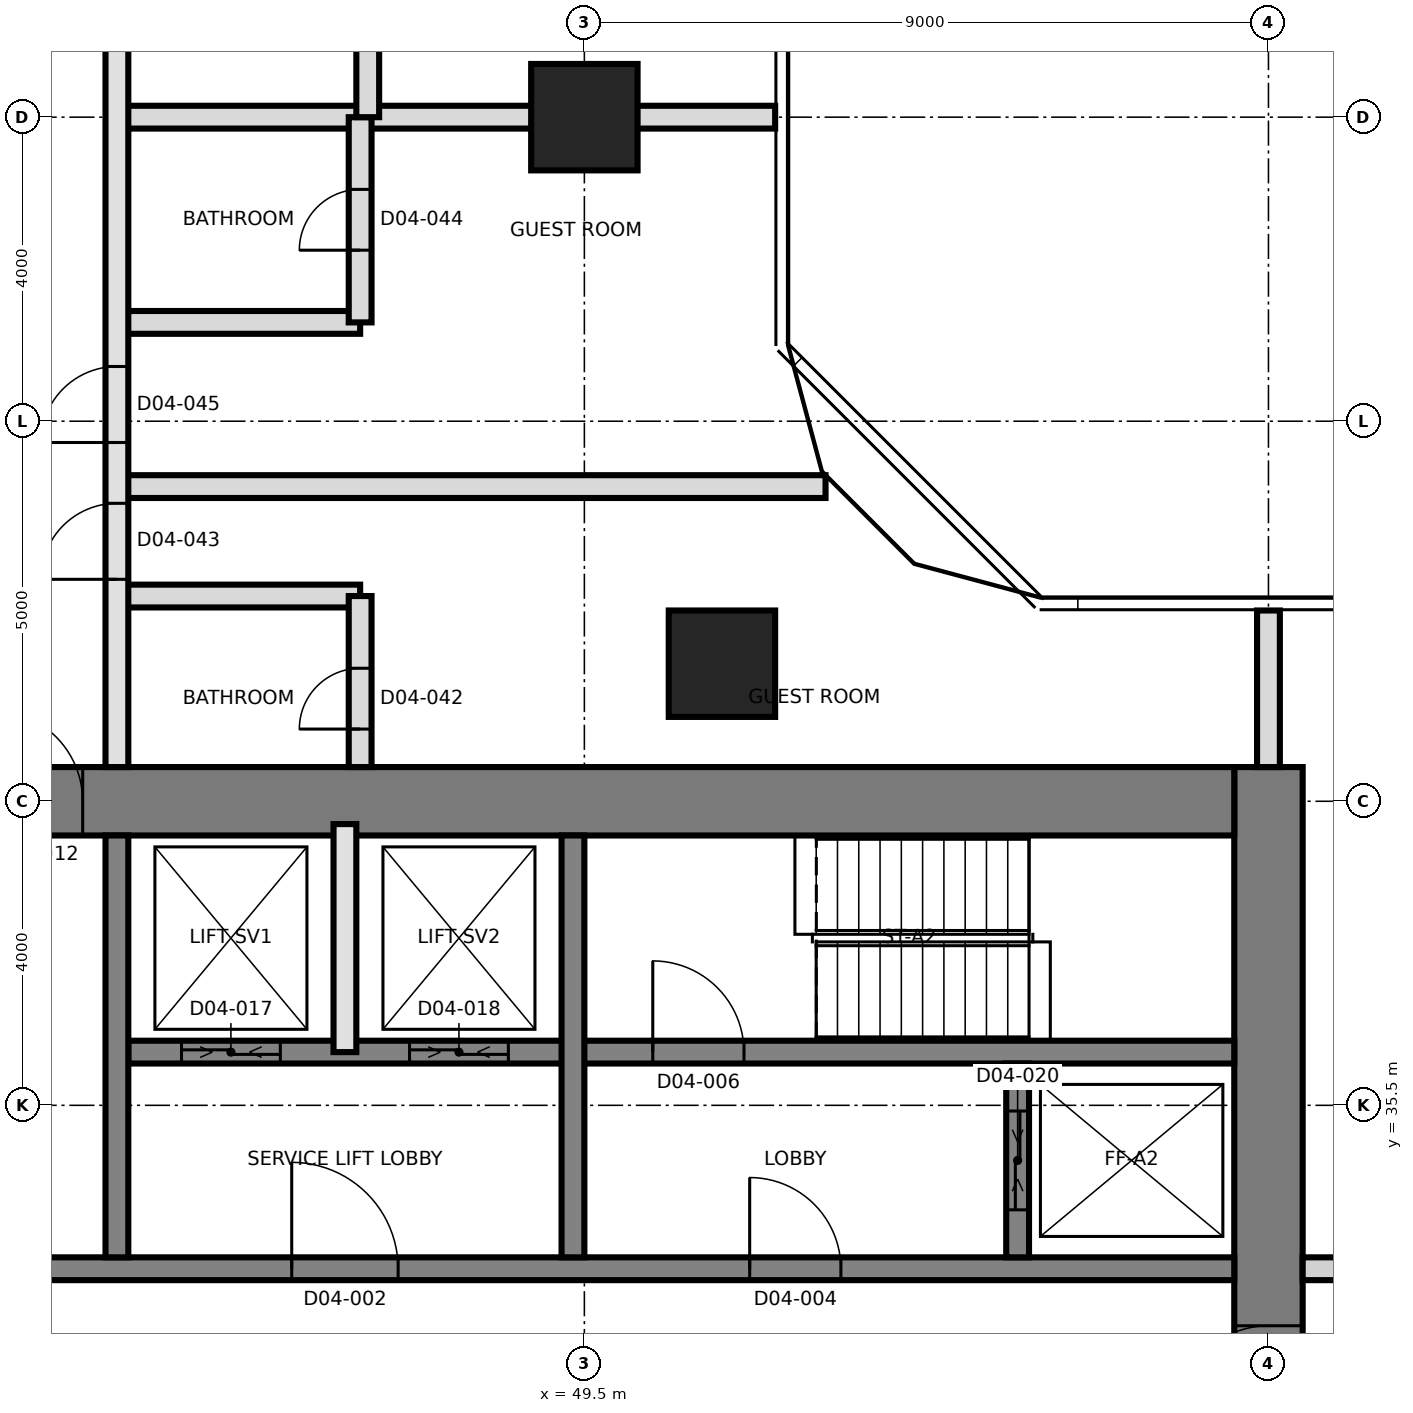
"""IFC4 building model, lengths in metres.
Left out: names, types, materials, properties, quantities, classifications, styles, units other than length and angle.
Written with IfcOpenShell. Run it as: python <this file> out.ifc"""

import sys

from ifc_helpers import new_model, si_unit, direction, frame, frame_2d, origin, origin_2d, place, context, subcontext, project, spatial, rectangle, extrude, element, fill, save


model = new_model("IFC4")
c1 = context("Model", 3, precision=1e-05, world=origin(), true_north=direction((0.0, 1.0)))
c2 = subcontext(c1, "Body", "Model", "MODEL_VIEW")
j1 = project(units=[si_unit("LENGTHUNIT", "METRE"), si_unit("PLANEANGLEUNIT", "RADIAN")], contexts=[c1])
p1 = place(None, origin())
s1 = spatial("IfcSite", under=j1, at=p1, CompositionType="ELEMENT")
p2 = place(p1, origin())
s2 = spatial("IfcBuilding", under=s1, at=p2, CompositionType="ELEMENT")
p3 = place(p2, frame((0.0, 0.0, 63.1)))
s3 = spatial("IfcBuildingStorey", under=s2, at=p3, CompositionType="ELEMENT", Elevation=63.1)
p4 = place(p3, frame((58.5, 21.05, 0.0), z_axis=(0.0, 0.0, 1.0), x_axis=(0.0, 1.0, 0.0)))
e1 = element("IfcWall", 1, at=p4, inside=s3, PredefinedType="SHEAR", context=c2, shape_type="SweptSolid", body=[
    extrude(rectangle(XDim=18.9, YDim=0.9, at=frame_2d((9.45, 0.0))), origin(), (0.0, 0.0, 1.0), 3.7),
])
p5 = place(p4, frame((10.35, 0.0, 0.0)))
e2 = element("IfcOpeningElement", 2, at=p5, cuts=e1, PredefinedType="OPENING", context=c2, shape_type="SweptSolid", body=[
    extrude(rectangle(XDim=1.2, YDim=2.1, at=frame_2d((0.6, 1.05))), frame((0.0, 0.46, 0.0), z_axis=(0.0, -1.0, 0.0), x_axis=(1.0, 0.0, 0.0)), (0.0, 0.0, 1.0), 0.92),
])
p6 = place(p3, frame((31.05, 39.5, 0.0), z_axis=(0.0, 0.0, 1.0), x_axis=(1.0, 0.0, 0.0)))
e3 = element("IfcWall", 3, at=p6, inside=s3, PredefinedType="SHEAR", context=c2, shape_type="SweptSolid", body=[
    extrude(rectangle(XDim=27.0, YDim=0.9, at=frame_2d((13.5, 0.0))), origin(), (0.0, 0.0, 1.0), 3.7),
])
p7 = place(p6, frame((10.65, 0.0, 0.0)))
e4 = element("IfcOpeningElement", 4, at=p7, cuts=e3, PredefinedType="OPENING", context=c2, shape_type="SweptSolid", body=[
    extrude(rectangle(XDim=1.2, YDim=2.1, at=frame_2d((0.6, 1.05))), frame((0.0, 0.46, 0.0), z_axis=(0.0, -1.0, 0.0), x_axis=(1.0, 0.0, 0.0)), (0.0, 0.0, 1.0), 0.92),
])
p8 = place(p3, frame((31.95, 33.35, 0.0), z_axis=(0.0, 0.0, 1.0), x_axis=(1.0, 0.0, 0.0)))
e5 = element("IfcWall", 5, at=p8, inside=s3, PredefinedType="SHEAR", context=c2, shape_type="SweptSolid", body=[
    extrude(rectangle(XDim=26.1, YDim=0.3, at=frame_2d((13.05, 0.0))), origin(), (0.0, 0.0, 1.0), 3.7),
])
p9 = place(p8, frame((13.7, 0.0, 0.0)))
e6 = element("IfcOpeningElement", 6, at=p9, cuts=e5, PredefinedType="OPENING", context=c2, shape_type="SweptSolid", body=[
    extrude(rectangle(XDim=1.4, YDim=2.1, at=frame_2d((0.7, 1.05))), frame((0.0, 0.16, 0.0), z_axis=(0.0, -1.0, 0.0), x_axis=(1.0, 0.0, 0.0)), (0.0, 0.0, 1.0), 0.32),
])
p10 = place(p8, frame((5.175, 0.0, 0.0)))
e7 = element("IfcOpeningElement", 7, at=p10, cuts=e5, PredefinedType="OPENING", context=c2, shape_type="SweptSolid", body=[
    extrude(rectangle(XDim=1.2, YDim=2.1, at=frame_2d((0.6, 1.05))), frame((0.0, 0.16, 0.0), z_axis=(0.0, -1.0, 0.0), x_axis=(1.0, 0.0, 0.0)), (0.0, 0.0, 1.0), 0.32),
])
p11 = place(p8, frame((19.725, 0.0, 0.0)))
e8 = element("IfcOpeningElement", 8, at=p11, cuts=e5, PredefinedType="OPENING", context=c2, shape_type="SweptSolid", body=[
    extrude(rectangle(XDim=1.2, YDim=2.1, at=frame_2d((0.6, 1.05))), frame((0.0, 0.16, 0.0), z_axis=(0.0, -1.0, 0.0), x_axis=(1.0, 0.0, 0.0)), (0.0, 0.0, 1.0), 0.32),
])
p12 = place(p3, frame((43.5, 36.2, 0.0), z_axis=(0.0, 0.0, 1.0), x_axis=(1.0, 0.0, 0.0)))
e9 = element("IfcWall", 9, at=p12, inside=s3, PredefinedType="SHEAR", context=c2, shape_type="SweptSolid", body=[
    extrude(rectangle(XDim=14.55, YDim=0.3, at=frame_2d((7.275, 0.0))), origin(), (0.0, 0.0, 1.0), 3.7),
])
p13 = place(p12, frame((6.9, 0.0, 0.0)))
e10 = element("IfcOpeningElement", 10, at=p13, cuts=e9, PredefinedType="OPENING", context=c2, shape_type="SweptSolid", body=[
    extrude(rectangle(XDim=1.2, YDim=2.1, at=frame_2d((0.6, 1.05))), frame((0.0, 0.16, 0.0), z_axis=(0.0, -1.0, 0.0), x_axis=(1.0, 0.0, 0.0)), (0.0, 0.0, 1.0), 0.32),
])
p14 = place(p12, frame((0.7, 0.0, 0.0)))
e11 = element("IfcOpeningElement", 11, at=p14, cuts=e9, PredefinedType="OPENING", context=c2, shape_type="SweptSolid", body=[
    extrude(rectangle(XDim=1.3, YDim=2.4, at=frame_2d((0.65, 1.2))), frame((0.0, 0.16, 0.0), z_axis=(0.0, -1.0, 0.0), x_axis=(1.0, 0.0, 0.0)), (0.0, 0.0, 1.0), 0.32),
])
p15 = place(p12, frame((3.7, 0.0, 0.0)))
e12 = element("IfcOpeningElement", 12, at=p15, cuts=e9, PredefinedType="OPENING", context=c2, shape_type="SweptSolid", body=[
    extrude(rectangle(XDim=1.3, YDim=2.4, at=frame_2d((0.65, 1.2))), frame((0.0, 0.16, 0.0), z_axis=(0.0, -1.0, 0.0), x_axis=(1.0, 0.0, 0.0)), (0.0, 0.0, 1.0), 0.32),
])
for number, where, z_axis, x_axis in (
    (13, (43.35, 33.5, 0.0), (0.0, 0.0, 1.0), (0.0, 1.0, 0.0)),
    (14, (49.35, 33.5, 0.0), (0.0, 0.0, 1.0), (0.0, 1.0, 0.0)),
):
    element("IfcWall", number, at=place(p3, frame(where, z_axis=z_axis, x_axis=x_axis)), inside=s3, PredefinedType="SHEAR", context=c2, shape_type="SweptSolid", body=[
        extrude(rectangle(XDim=5.55, YDim=0.3, at=frame_2d((2.775, 0.0))), origin(), (0.0, 0.0, 1.0), 3.7),
    ])
p16 = place(p3, frame((55.2, 33.5, 0.0), z_axis=(0.0, 0.0, 1.0), x_axis=(0.0, 1.0, 0.0)))
e15 = element("IfcWall", 15, at=p16, inside=s3, PredefinedType="SHEAR", context=c2, shape_type="SweptSolid", body=[
    extrude(rectangle(XDim=2.55, YDim=0.3, at=frame_2d((1.275, 0.0))), origin(), (0.0, 0.0, 1.0), 3.7),
])
p17 = place(p16, frame((0.625, 0.0, 0.0)))
e16 = element("IfcOpeningElement", 16, at=p17, cuts=e15, PredefinedType="OPENING", context=c2, shape_type="SweptSolid", body=[
    extrude(rectangle(XDim=1.3, YDim=2.4, at=frame_2d((0.65, 1.2))), frame((0.0, 0.16, 0.0), z_axis=(0.0, -1.0, 0.0), x_axis=(1.0, 0.0, 0.0)), (0.0, 0.0, 1.0), 0.32),
])
for number, where, z_axis, x_axis in (
    (17, (51.31, 41.31, 0.0), (0.0, 0.0, 1.0), (1.0, 0.0, 0.0)),
    (18, (49.5, 48.5, 0.0), (0.0, 0.0, 1.0), (1.0, 0.0, 0.0)),
):
    element("IfcColumn", number, at=place(p3, frame(where, z_axis=z_axis, x_axis=x_axis)), inside=s3, PredefinedType="COLUMN", context=c2, shape_type="SweptSolid", body=[
        extrude(rectangle(XDim=1.4, YDim=1.4, at=origin_2d()), origin(), (0.0, 0.0, 1.0), 3.7),
    ])
p18 = place(p3, frame((46.35, 36.2, 0.0), z_axis=(0.0, 0.0, 1.0), x_axis=(0.0, 1.0, 0.0)))
e19 = element("IfcWall", 19, at=p18, inside=s3, PredefinedType="SOLIDWALL", context=c2, shape_type="SweptSolid", body=[
    extrude(rectangle(XDim=3.0, YDim=0.3, at=frame_2d((1.5, 0.0))), origin(), (0.0, 0.0, 1.0), 3.4),
])
p19 = place(p3, frame((58.95, 33.35, 0.0), z_axis=(0.0, 0.0, 1.0), x_axis=(1.0, 0.0, 0.0)))
e20 = element("IfcWall", 20, at=p19, inside=s3, PredefinedType="PARTITIONING", context=c2, shape_type="SweptSolid", body=[
    extrude(rectangle(XDim=26.38, YDim=0.3, at=frame_2d((13.19, 0.0))), origin(), (0.0, 0.0, 1.0), 3.4),
])
p20 = place(p19, frame((1.9, 0.0, 0.0)))
e21 = element("IfcOpeningElement", 21, at=p20, cuts=e20, PredefinedType="OPENING", context=c2, shape_type="SweptSolid", body=[
    extrude(rectangle(XDim=1.0, YDim=2.4, at=frame_2d((0.5, 1.2))), frame((0.0, 0.16, 0.0), z_axis=(0.0, -1.0, 0.0), x_axis=(1.0, 0.0, 0.0)), (0.0, 0.0, 1.0), 0.32),
])
p21 = place(p19, frame((9.685, 0.0, 0.0)))
e22 = element("IfcOpeningElement", 22, at=p21, cuts=e20, PredefinedType="OPENING", context=c2, shape_type="SweptSolid", body=[
    extrude(rectangle(XDim=1.2, YDim=2.1, at=frame_2d((0.6, 1.05))), frame((0.0, 0.16, 0.0), z_axis=(0.0, -1.0, 0.0), x_axis=(1.0, 0.0, 0.0)), (0.0, 0.0, 1.0), 0.32),
])
p22 = place(p19, frame((12.935, 0.0, 0.0)))
e23 = element("IfcOpeningElement", 23, at=p22, cuts=e20, PredefinedType="OPENING", context=c2, shape_type="SweptSolid", body=[
    extrude(rectangle(XDim=1.0, YDim=2.1, at=frame_2d((0.5, 1.05))), frame((0.0, 0.16, 0.0), z_axis=(0.0, -1.0, 0.0), x_axis=(1.0, 0.0, 0.0)), (0.0, 0.0, 1.0), 0.32),
])
p23 = place(p19, frame((18.7, 0.0, 0.0)))
e24 = element("IfcOpeningElement", 24, at=p23, cuts=e20, PredefinedType="OPENING", context=c2, shape_type="SweptSolid", body=[
    extrude(rectangle(XDim=1.0, YDim=2.1, at=frame_2d((0.5, 1.05))), frame((0.0, 0.16, 0.0), z_axis=(0.0, -1.0, 0.0), x_axis=(1.0, 0.0, 0.0)), (0.0, 0.0, 1.0), 0.32),
])
p24 = place(p19, frame((24.55, 0.0, 0.0)))
e25 = element("IfcOpeningElement", 25, at=p24, cuts=e20, PredefinedType="OPENING", context=c2, shape_type="SweptSolid", body=[
    extrude(rectangle(XDim=1.0, YDim=2.1, at=frame_2d((0.5, 1.05))), frame((0.0, 0.16, 0.0), z_axis=(0.0, -1.0, 0.0), x_axis=(1.0, 0.0, 0.0)), (0.0, 0.0, 1.0), 0.32),
])
p25 = place(p3, frame((43.35, 42.2, 0.0), z_axis=(0.0, 0.0, 1.0), x_axis=(1.0, 0.0, 0.0)))
e26 = element("IfcWall", 26, at=p25, inside=s3, PredefinedType="PARTITIONING", context=c2, shape_type="SweptSolid", body=[
    extrude(rectangle(XDim=3.2, YDim=0.3, at=frame_2d((1.6, 0.0))), origin(), (0.0, 0.0, 1.0), 3.4),
])
p26 = place(p3, frame((43.35, 43.64, 0.0), z_axis=(0.0, 0.0, 1.0), x_axis=(1.0, 0.0, 0.0)))
e27 = element("IfcWall", 27, at=p26, inside=s3, PredefinedType="PARTITIONING", context=c2, shape_type="SweptSolid", body=[
    extrude(rectangle(XDim=9.323, YDim=0.3, at=frame_2d((4.662, 0.0))), origin(), (0.0, 0.0, 1.0), 3.4),
])
p27 = place(p3, frame((43.35, 45.8, 0.0), z_axis=(0.0, 0.0, 1.0), x_axis=(1.0, 0.0, 0.0)))
e28 = element("IfcWall", 28, at=p27, inside=s3, PredefinedType="PARTITIONING", context=c2, shape_type="SweptSolid", body=[
    extrude(rectangle(XDim=3.2, YDim=0.3, at=frame_2d((1.6, 0.0))), origin(), (0.0, 0.0, 1.0), 3.4),
])
p28 = place(p3, frame((43.35, 48.5, 0.0), z_axis=(0.0, 0.0, 1.0), x_axis=(1.0, 0.0, 0.0)))
e29 = element("IfcWall", 29, at=p28, inside=s3, PredefinedType="PARTITIONING", context=c2, shape_type="SweptSolid", body=[
    extrude(rectangle(XDim=8.66, YDim=0.3, at=frame_2d((4.33, 0.0))), origin(), (0.0, 0.0, 1.0), 3.4),
])
p29 = place(p3, frame((43.35, 39.95, 0.0), z_axis=(0.0, 0.0, 1.0), x_axis=(0.0, 1.0, 0.0)))
e30 = element("IfcWall", 30, at=p29, inside=s3, PredefinedType="SOLIDWALL", context=c2, shape_type="SweptSolid", body=[
    extrude(rectangle(XDim=25.8, YDim=0.3, at=frame_2d((12.9, 0.0))), origin(), (0.0, 0.0, 1.0), 3.4),
])
p30 = place(p29, frame((2.47, 0.0, 0.0)))
e31 = element("IfcOpeningElement", 31, at=p30, cuts=e30, PredefinedType="OPENING", context=c2, shape_type="SweptSolid", body=[
    extrude(rectangle(XDim=1.0, YDim=2.1, at=frame_2d((0.5, 1.05))), frame((0.0, 0.16, 0.0), z_axis=(0.0, -1.0, 0.0), x_axis=(1.0, 0.0, 0.0)), (0.0, 0.0, 1.0), 0.32),
])
p31 = place(p29, frame((4.27, 0.0, 0.0)))
e32 = element("IfcOpeningElement", 32, at=p31, cuts=e30, PredefinedType="OPENING", context=c2, shape_type="SweptSolid", body=[
    extrude(rectangle(XDim=1.0, YDim=2.1, at=frame_2d((0.5, 1.05))), frame((0.0, 0.16, 0.0), z_axis=(0.0, -1.0, 0.0), x_axis=(1.0, 0.0, 0.0)), (0.0, 0.0, 1.0), 0.32),
])
p32 = place(p29, frame((12.55, 0.0, 0.0)))
e33 = element("IfcOpeningElement", 33, at=p32, cuts=e30, PredefinedType="OPENING", context=c2, shape_type="SweptSolid", body=[
    extrude(rectangle(XDim=1.0, YDim=2.4, at=frame_2d((0.5, 1.2))), frame((0.0, 0.16, 0.0), z_axis=(0.0, -1.0, 0.0), x_axis=(1.0, 0.0, 0.0)), (0.0, 0.0, 1.0), 0.32),
])
p33 = place(p29, frame((19.55, 0.0, 0.0)))
e34 = element("IfcOpeningElement", 34, at=p33, cuts=e30, PredefinedType="OPENING", context=c2, shape_type="SweptSolid", body=[
    extrude(rectangle(XDim=1.0, YDim=2.4, at=frame_2d((0.5, 1.2))), frame((0.0, 0.16, 0.0), z_axis=(0.0, -1.0, 0.0), x_axis=(1.0, 0.0, 0.0)), (0.0, 0.0, 1.0), 0.32),
])
p34 = place(p3, frame((46.55, 39.95, 0.0), z_axis=(0.0, 0.0, 1.0), x_axis=(0.0, 1.0, 0.0)))
e35 = element("IfcWall", 35, at=p34, inside=s3, PredefinedType="PARTITIONING", context=c2, shape_type="SweptSolid", body=[
    extrude(rectangle(XDim=2.25, YDim=0.3, at=frame_2d((1.125, 0.0))), origin(), (0.0, 0.0, 1.0), 3.4),
])
p35 = place(p34, frame((0.5, 0.0, 0.0)))
e36 = element("IfcOpeningElement", 36, at=p35, cuts=e35, PredefinedType="OPENING", context=c2, shape_type="SweptSolid", body=[
    extrude(rectangle(XDim=0.8, YDim=2.1, at=frame_2d((0.4, 1.05))), frame((0.0, 0.16, 0.0), z_axis=(0.0, -1.0, 0.0), x_axis=(1.0, 0.0, 0.0)), (0.0, 0.0, 1.0), 0.32),
])
p36 = place(p3, frame((46.55, 45.8, 0.0), z_axis=(0.0, 0.0, 1.0), x_axis=(0.0, 1.0, 0.0)))
e37 = element("IfcWall", 37, at=p36, inside=s3, PredefinedType="PARTITIONING", context=c2, shape_type="SweptSolid", body=[
    extrude(rectangle(XDim=2.7, YDim=0.3, at=frame_2d((1.35, 0.0))), origin(), (0.0, 0.0, 1.0), 3.4),
])
p37 = place(p36, frame((0.95, 0.0, 0.0)))
e38 = element("IfcOpeningElement", 38, at=p37, cuts=e37, PredefinedType="OPENING", context=c2, shape_type="SweptSolid", body=[
    extrude(rectangle(XDim=0.8, YDim=2.1, at=frame_2d((0.4, 1.05))), frame((0.0, 0.16, 0.0), z_axis=(0.0, -1.0, 0.0), x_axis=(1.0, 0.0, 0.0)), (0.0, 0.0, 1.0), 0.32),
])
p38 = place(p3, frame((46.65, 48.5, 0.0), z_axis=(0.0, 0.0, 1.0), x_axis=(0.0, 1.0, 0.0)))
e39 = element("IfcWall", 39, at=p38, inside=s3, PredefinedType="PARTITIONING", context=c2, shape_type="SweptSolid", body=[
    extrude(rectangle(XDim=3.0, YDim=0.3, at=frame_2d((1.5, 0.0))), origin(), (0.0, 0.0, 1.0), 3.4),
])
p39 = place(p38, frame((1.1, 0.0, 0.0)))
e40 = element("IfcOpeningElement", 40, at=p39, cuts=e39, PredefinedType="OPENING", context=c2, shape_type="SweptSolid", body=[
    extrude(rectangle(XDim=0.8, YDim=2.1, at=frame_2d((0.4, 1.05))), frame((0.0, 0.16, 0.0), z_axis=(0.0, -1.0, 0.0), x_axis=(1.0, 0.0, 0.0)), (0.0, 0.0, 1.0), 0.32),
])
p40 = place(p3, frame((58.5, 39.95, 0.0), z_axis=(0.0, 0.0, 1.0), x_axis=(0.0, 1.0, 0.0)))
e41 = element("IfcWall", 41, at=p40, inside=s3, PredefinedType="PARTITIONING", context=c2, shape_type="SweptSolid", body=[
    extrude(rectangle(XDim=2.06, YDim=0.3, at=frame_2d((1.03, 0.0))), origin(), (0.0, 0.0, 1.0), 3.4),
])
p41 = place(p9, origin())
e42 = element("IfcDoor", 42, at=p41, inside=s3, OperationType="SINGLE_SWING_RIGHT", PredefinedType="DOOR", context=c2, shape_type="SweptSolid", body=[
    extrude(rectangle(XDim=1.4, YDim=2.1, at=frame_2d((0.7, 1.05))), frame((0.0, 0.025, 0.0), z_axis=(0.0, -1.0, 0.0), x_axis=(1.0, 0.0, 0.0)), (0.0, 0.0, 1.0), 0.05),
])
fill(e6, e42)
p42 = place(p11, origin())
e43 = element("IfcDoor", 43, at=p42, inside=s3, OperationType="SINGLE_SWING_RIGHT", PredefinedType="DOOR", context=c2, shape_type="SweptSolid", body=[
    extrude(rectangle(XDim=1.2, YDim=2.1, at=frame_2d((0.6, 1.05))), frame((0.0, 0.025, 0.0), z_axis=(0.0, -1.0, 0.0), x_axis=(1.0, 0.0, 0.0)), (0.0, 0.0, 1.0), 0.05),
])
fill(e8, e43)
p43 = place(p13, origin())
e44 = element("IfcDoor", 44, at=p43, inside=s3, OperationType="SINGLE_SWING_LEFT", PredefinedType="DOOR", context=c2, shape_type="SweptSolid", body=[
    extrude(rectangle(XDim=1.2, YDim=2.1, at=frame_2d((0.6, 1.05))), frame((0.0, 0.025, 0.0), z_axis=(0.0, -1.0, 0.0), x_axis=(1.0, 0.0, 0.0)), (0.0, 0.0, 1.0), 0.05),
])
fill(e10, e44)
p44 = place(p5, origin())
e45 = element("IfcDoor", 45, at=p44, inside=s3, OperationType="SINGLE_SWING_LEFT", PredefinedType="DOOR", context=c2, shape_type="SweptSolid", body=[
    extrude(rectangle(XDim=1.2, YDim=2.1, at=frame_2d((0.6, 1.05))), frame((0.0, 0.025, 0.0), z_axis=(0.0, -1.0, 0.0), x_axis=(1.0, 0.0, 0.0)), (0.0, 0.0, 1.0), 0.05),
])
fill(e2, e45)
p45 = place(p7, origin())
e46 = element("IfcDoor", 46, at=p45, inside=s3, OperationType="SINGLE_SWING_RIGHT", PredefinedType="DOOR", context=c2, shape_type="SweptSolid", body=[
    extrude(rectangle(XDim=1.2, YDim=2.1, at=frame_2d((0.6, 1.05))), frame((0.0, 0.025, 0.0), z_axis=(0.0, -1.0, 0.0), x_axis=(1.0, 0.0, 0.0)), (0.0, 0.0, 1.0), 0.05),
])
fill(e4, e46)
p46 = place(p14, origin())
e47 = element("IfcDoor", 47, at=p46, inside=s3, OperationType="SLIDING_TO_LEFT", PredefinedType="DOOR", context=c2, shape_type="SweptSolid", body=[
    extrude(rectangle(XDim=1.3, YDim=2.4, at=frame_2d((0.65, 1.2))), frame((0.0, 0.025, 0.0), z_axis=(0.0, -1.0, 0.0), x_axis=(1.0, 0.0, 0.0)), (0.0, 0.0, 1.0), 0.05),
])
fill(e11, e47)
p47 = place(p15, origin())
e48 = element("IfcDoor", 48, at=p47, inside=s3, OperationType="SLIDING_TO_LEFT", PredefinedType="DOOR", context=c2, shape_type="SweptSolid", body=[
    extrude(rectangle(XDim=1.3, YDim=2.4, at=frame_2d((0.65, 1.2))), frame((0.0, 0.025, 0.0), z_axis=(0.0, -1.0, 0.0), x_axis=(1.0, 0.0, 0.0)), (0.0, 0.0, 1.0), 0.05),
])
fill(e12, e48)
p48 = place(p17, origin())
e49 = element("IfcDoor", 49, at=p48, inside=s3, OperationType="SLIDING_TO_LEFT", PredefinedType="DOOR", context=c2, shape_type="SweptSolid", body=[
    extrude(rectangle(XDim=1.3, YDim=2.4, at=frame_2d((0.65, 1.2))), frame((0.0, 0.025, 0.0), z_axis=(0.0, -1.0, 0.0), x_axis=(1.0, 0.0, 0.0)), (0.0, 0.0, 1.0), 0.05),
])
fill(e16, e49)
p49 = place(p35, origin())
e50 = element("IfcDoor", 50, at=p49, inside=s3, OperationType="SINGLE_SWING_RIGHT", PredefinedType="DOOR", context=c2, shape_type="SweptSolid", body=[
    extrude(rectangle(XDim=0.8, YDim=2.1, at=frame_2d((0.4, 1.05))), frame((0.0, 0.025, 0.0), z_axis=(0.0, -1.0, 0.0), x_axis=(1.0, 0.0, 0.0)), (0.0, 0.0, 1.0), 0.05),
])
fill(e36, e50)
p50 = place(p30, origin())
e51 = element("IfcDoor", 51, at=p50, inside=s3, OperationType="SINGLE_SWING_LEFT", PredefinedType="DOOR", context=c2, shape_type="SweptSolid", body=[
    extrude(rectangle(XDim=1.0, YDim=2.1, at=frame_2d((0.5, 1.05))), frame((0.0, 0.025, 0.0), z_axis=(0.0, -1.0, 0.0), x_axis=(1.0, 0.0, 0.0)), (0.0, 0.0, 1.0), 0.05),
])
fill(e31, e51)
p51 = place(p37, origin())
e52 = element("IfcDoor", 52, at=p51, inside=s3, OperationType="SINGLE_SWING_LEFT", PredefinedType="DOOR", context=c2, shape_type="SweptSolid", body=[
    extrude(rectangle(XDim=0.8, YDim=2.1, at=frame_2d((0.4, 1.05))), frame((0.0, 0.025, 0.0), z_axis=(0.0, -1.0, 0.0), x_axis=(1.0, 0.0, 0.0)), (0.0, 0.0, 1.0), 0.05),
])
fill(e38, e52)
p52 = place(p31, origin())
e53 = element("IfcDoor", 53, at=p52, inside=s3, OperationType="SINGLE_SWING_LEFT", PredefinedType="DOOR", context=c2, shape_type="SweptSolid", body=[
    extrude(rectangle(XDim=1.0, YDim=2.1, at=frame_2d((0.5, 1.05))), frame((0.0, 0.025, 0.0), z_axis=(0.0, -1.0, 0.0), x_axis=(1.0, 0.0, 0.0)), (0.0, 0.0, 1.0), 0.05),
])
fill(e32, e53)
save(model, sys.argv[1])
